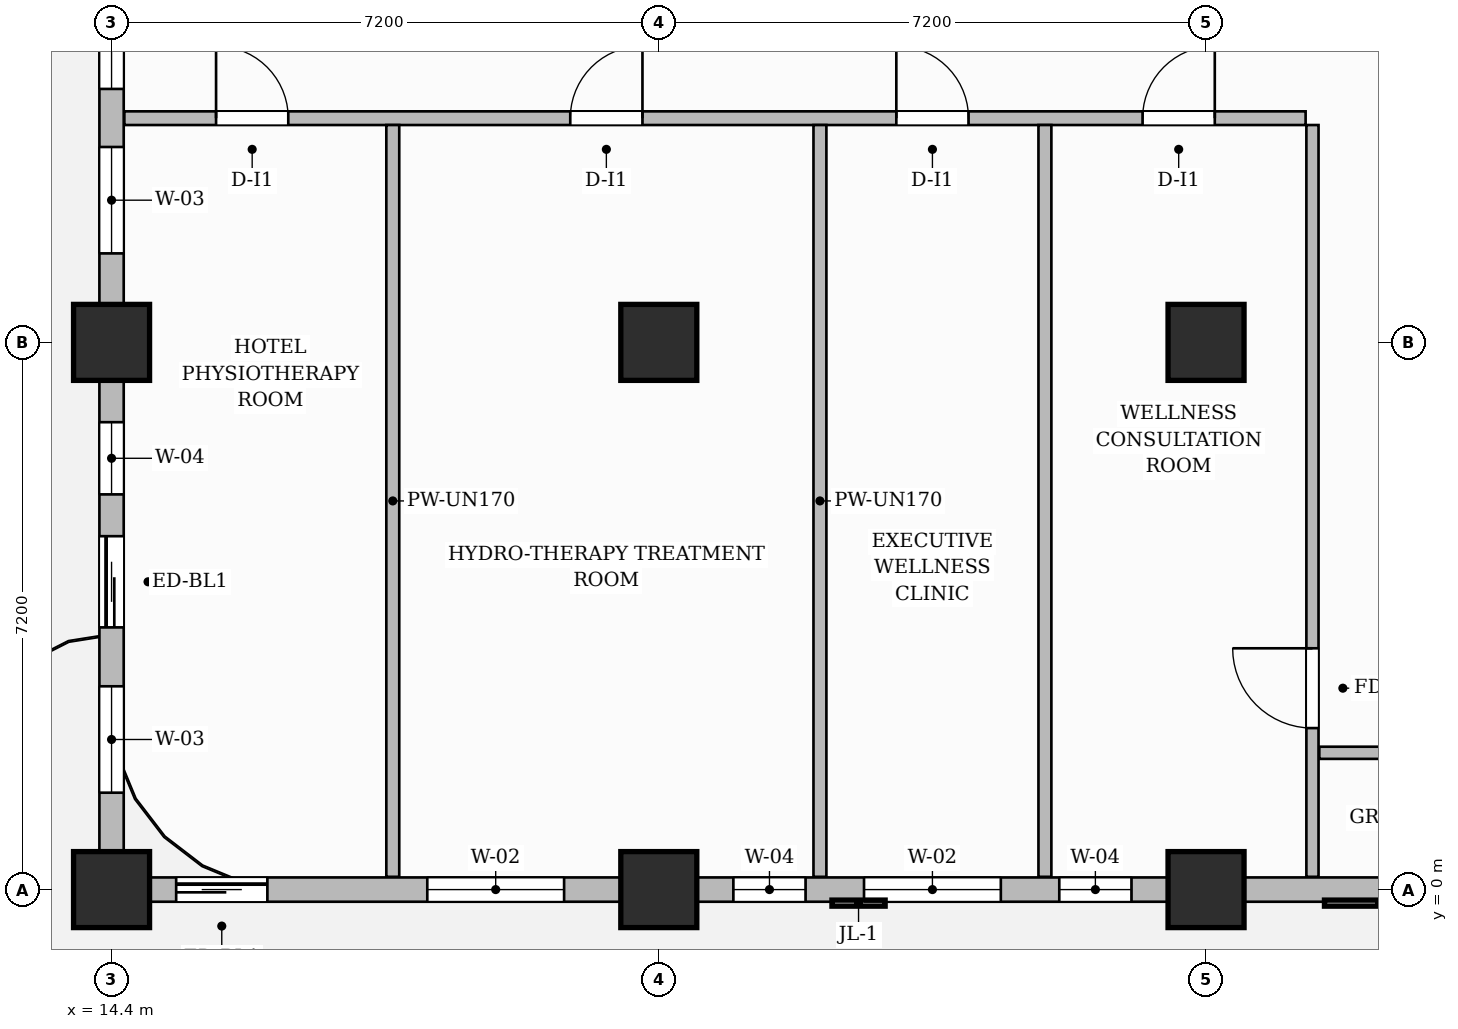
"""IFC4 building model, lengths in metres.
Left out: names, types, materials, properties, quantities, classifications, styles, units other than length and angle.
Written with IfcOpenShell. Run it as: python <this file> out.ifc"""

import sys

from ifc_helpers import new_model, si_unit, direction, frame, frame_2d, origin, origin_2d, place, context, subcontext, project, spatial, rectangle, extrude, source, transform, mapped, element, fill, save


model = new_model("IFC4")
c1 = context("Model", 3, precision=1e-05, world=origin(), true_north=direction((0.0, 1.0)))
c2 = subcontext(c1, "Body", "Model", "MODEL_VIEW")
j1 = project(units=[si_unit("LENGTHUNIT", "METRE"), si_unit("PLANEANGLEUNIT", "RADIAN")], contexts=[c1])
p1 = place(None, origin())
s1 = spatial("IfcSite", under=j1, at=p1, CompositionType="ELEMENT")
p2 = place(p1, origin())
s2 = spatial("IfcBuilding", under=s1, at=p2, CompositionType="ELEMENT")
p3 = place(p2, frame((0.0, 0.0, 137.7)))
s3 = spatial("IfcBuildingStorey", under=s2, at=p3, CompositionType="ELEMENT", Elevation=137.7)
m1 = source(origin(), c2, "Body", "SweptSolid", [
    extrude(rectangle(XDim=1.0, YDim=1.0, at=origin_2d()), origin(), (0.0, 0.0, 1.0), 3.7),
])
for number, where, z_axis, x_axis in (
    (1, (14.4, 0.0, 0.0), (0.0, 0.0, 1.0), (1.0, 0.0, 0.0)),
    (2, (14.4, 7.2, 0.0), (0.0, 0.0, 1.0), (1.0, 0.0, 0.0)),
    (3, (21.6, 0.0, 0.0), (0.0, 0.0, 1.0), (1.0, 0.0, 0.0)),
    (4, (21.6, 7.2, 0.0), (0.0, 0.0, 1.0), (1.0, 0.0, 0.0)),
    (5, (28.8, 0.0, 0.0), (0.0, 0.0, 1.0), (1.0, 0.0, 0.0)),
    (6, (28.8, 7.2, 0.0), (0.0, 0.0, 1.0), (1.0, 0.0, 0.0)),
):
    element("IfcColumn", number, at=place(p3, frame(where, z_axis=z_axis, x_axis=x_axis)), inside=s3, PredefinedType="COLUMN", context=c2, shape_type="MappedRepresentation", body=[
        mapped(m1, transform((0.0, 0.0, 0.0), scale=1.0)),
    ])
p4 = place(p3, frame((14.568, 10.15, 0.0), z_axis=(0.0, 0.0, 1.0), x_axis=(1.0, 0.0, 0.0)))
e7 = element("IfcWall", 7, at=p4, inside=s3, PredefinedType="PARTITIONING", context=c2, shape_type="SweptSolid", body=[
    extrude(rectangle(XDim=15.542, YDim=0.18, at=frame_2d((7.771, 0.0))), origin(), (0.0, 0.0, 1.0), 3.45),
])
p5 = place(p4, frame((1.207, 0.0, 0.0)))
e8 = element("IfcOpeningElement", 8, at=p5, cuts=e7, PredefinedType="OPENING", context=c2, shape_type="SweptSolid", body=[
    extrude(rectangle(XDim=0.95, YDim=2.15, at=frame_2d((0.475, 1.075))), frame((0.0, 0.1, 0.0), z_axis=(0.0, -1.0, 0.0), x_axis=(1.0, 0.0, 0.0)), (0.0, 0.0, 1.0), 0.2),
])
p6 = place(p4, frame((5.867, 0.0, 0.0)))
e9 = element("IfcOpeningElement", 9, at=p6, cuts=e7, PredefinedType="OPENING", context=c2, shape_type="SweptSolid", body=[
    extrude(rectangle(XDim=0.95, YDim=2.15, at=frame_2d((0.475, 1.075))), frame((0.0, 0.1, 0.0), z_axis=(0.0, -1.0, 0.0), x_axis=(1.0, 0.0, 0.0)), (0.0, 0.0, 1.0), 0.2),
])
p7 = place(p4, frame((10.157, 0.0, 0.0)))
e10 = element("IfcOpeningElement", 10, at=p7, cuts=e7, PredefinedType="OPENING", context=c2, shape_type="SweptSolid", body=[
    extrude(rectangle(XDim=0.95, YDim=2.15, at=frame_2d((0.475, 1.075))), frame((0.0, 0.1, 0.0), z_axis=(0.0, -1.0, 0.0), x_axis=(1.0, 0.0, 0.0)), (0.0, 0.0, 1.0), 0.2),
])
p8 = place(p4, frame((13.397, 0.0, 0.0)))
e11 = element("IfcOpeningElement", 11, at=p8, cuts=e7, PredefinedType="OPENING", context=c2, shape_type="SweptSolid", body=[
    extrude(rectangle(XDim=0.95, YDim=2.15, at=frame_2d((0.475, 1.075))), frame((0.0, 0.1, 0.0), z_axis=(0.0, -1.0, 0.0), x_axis=(1.0, 0.0, 0.0)), (0.0, 0.0, 1.0), 0.2),
])
p9 = place(p3, frame((30.2, 0.168, 0.0), z_axis=(0.0, 0.0, 1.0), x_axis=(0.0, 1.0, 0.0)))
e12 = element("IfcWall", 12, at=p9, inside=s3, PredefinedType="PARTITIONING", context=c2, shape_type="SweptSolid", body=[
    extrude(rectangle(XDim=9.892, YDim=0.16, at=frame_2d((4.946, 0.0))), origin(), (0.0, 0.0, 1.0), 3.45),
])
p10 = place(p9, frame((1.957, 0.0, 0.0)))
e13 = element("IfcOpeningElement", 13, at=p10, cuts=e12, PredefinedType="OPENING", context=c2, shape_type="SweptSolid", body=[
    extrude(rectangle(XDim=1.05, YDim=2.15, at=frame_2d((0.525, 1.075))), frame((0.0, 0.09, 0.0), z_axis=(0.0, -1.0, 0.0), x_axis=(1.0, 0.0, 0.0)), (0.0, 0.0, 1.0), 0.18),
])
p11 = place(p3, frame((30.29, 1.8, 0.0), z_axis=(0.0, 0.0, 1.0), x_axis=(1.0, 0.0, 0.0)))
e14 = element("IfcWall", 14, at=p11, inside=s3, PredefinedType="PARTITIONING", context=c2, shape_type="SweptSolid", body=[
    extrude(rectangle(XDim=19.37, YDim=0.16, at=frame_2d((9.685, 0.0))), origin(), (0.0, 0.0, 1.0), 3.45),
])
p12 = place(p11, frame((2.916, 0.0, 0.0)))
e15 = element("IfcOpeningElement", 15, at=p12, cuts=e14, PredefinedType="OPENING", context=c2, shape_type="SweptSolid", body=[
    extrude(rectangle(XDim=0.9, YDim=2.15, at=frame_2d((0.45, 1.075))), frame((0.0, 0.09, 0.0), z_axis=(0.0, -1.0, 0.0), x_axis=(1.0, 0.0, 0.0)), (0.0, 0.0, 1.0), 0.18),
])
p13 = place(p11, frame((9.66, 0.0, 0.0)))
e16 = element("IfcOpeningElement", 16, at=p13, cuts=e14, PredefinedType="OPENING", context=c2, shape_type="SweptSolid", body=[
    extrude(rectangle(XDim=0.9, YDim=2.15, at=frame_2d((0.45, 1.075))), frame((0.0, 0.09, 0.0), z_axis=(0.0, -1.0, 0.0), x_axis=(1.0, 0.0, 0.0)), (0.0, 0.0, 1.0), 0.18),
])
p14 = place(p11, frame((15.86, 0.0, 0.0)))
e17 = element("IfcOpeningElement", 17, at=p14, cuts=e14, PredefinedType="OPENING", context=c2, shape_type="SweptSolid", body=[
    extrude(rectangle(XDim=0.9, YDim=2.15, at=frame_2d((0.45, 1.075))), frame((0.0, 0.09, 0.0), z_axis=(0.0, -1.0, 0.0), x_axis=(1.0, 0.0, 0.0)), (0.0, 0.0, 1.0), 0.18),
])
p15 = place(p3, frame((18.1, 0.168, 0.0), z_axis=(0.0, 0.0, 1.0), x_axis=(0.0, 1.0, 0.0)))
e18 = element("IfcWall", 18, at=p15, inside=s3, PredefinedType="PARTITIONING", context=c2, shape_type="SweptSolid", body=[
    extrude(rectangle(XDim=9.892, YDim=0.17, at=frame_2d((4.946, 0.0))), origin(), (0.0, 0.0, 1.0), 3.105),
])
for number, where, z_axis, x_axis in (
    (19, (23.72, 0.168, 0.0), (0.0, 0.0, 1.0), (0.0, 1.0, 0.0)),
    (20, (26.68, 0.168, 0.0), (0.0, 0.0, 1.0), (0.0, 1.0, 0.0)),
):
    element("IfcWall", number, at=place(p3, frame(where, z_axis=z_axis, x_axis=x_axis)), inside=s3, PredefinedType="PARTITIONING", context=c2, shape_type="SweptSolid", body=[
        extrude(rectangle(XDim=9.892, YDim=0.17, at=frame_2d((4.946, 0.0))), origin(), (0.0, 0.0, 1.0), 3.45),
    ])
p16 = place(p3, frame((14.4, 0.0, 0.0), z_axis=(0.0, 0.0, 1.0), x_axis=(1.0, 0.0, 0.0)))
e21 = element("IfcWall", 21, at=p16, inside=s3, PredefinedType="SOLIDWALL", context=c2, shape_type="SweptSolid", body=[
    extrude(rectangle(XDim=35.4, YDim=0.32, at=frame_2d((17.7, 0.0))), origin(), (0.0, 0.0, 1.0), 2.935),
])
p17 = place(p16, frame((0.85, 0.0, 0.0)))
e22 = element("IfcOpeningElement", 22, at=p17, cuts=e21, PredefinedType="OPENING", context=c2, shape_type="SweptSolid", body=[
    extrude(rectangle(XDim=1.2, YDim=2.2, at=frame_2d((0.6, 1.1))), frame((0.0, 0.17, 0.0), z_axis=(0.0, -1.0, 0.0), x_axis=(1.0, 0.0, 0.0)), (0.0, 0.0, 1.0), 0.34),
])
p18 = place(p16, frame((4.154, 0.0, 0.8)))
e23 = element("IfcOpeningElement", 23, at=p18, cuts=e21, PredefinedType="OPENING", context=c2, shape_type="SweptSolid", body=[
    extrude(rectangle(XDim=1.8, YDim=1.85, at=frame_2d((0.9, 0.925))), frame((0.0, 0.17, 0.0), z_axis=(0.0, -1.0, 0.0), x_axis=(1.0, 0.0, 0.0)), (0.0, 0.0, 1.0), 0.34),
])
p19 = place(p16, frame((8.181, 0.0, 0.8)))
e24 = element("IfcOpeningElement", 24, at=p19, cuts=e21, PredefinedType="OPENING", context=c2, shape_type="SweptSolid", body=[
    extrude(rectangle(XDim=0.95, YDim=1.75, at=frame_2d((0.475, 0.875))), frame((0.0, 0.17, 0.0), z_axis=(0.0, -1.0, 0.0), x_axis=(1.0, 0.0, 0.0)), (0.0, 0.0, 1.0), 0.34),
])
p20 = place(p16, frame((9.9, 0.0, 0.8)))
e25 = element("IfcOpeningElement", 25, at=p20, cuts=e21, PredefinedType="OPENING", context=c2, shape_type="SweptSolid", body=[
    extrude(rectangle(XDim=1.8, YDim=1.85, at=frame_2d((0.9, 0.925))), frame((0.0, 0.17, 0.0), z_axis=(0.0, -1.0, 0.0), x_axis=(1.0, 0.0, 0.0)), (0.0, 0.0, 1.0), 0.34),
])
p21 = place(p16, frame((12.469, 0.0, 0.8)))
e26 = element("IfcOpeningElement", 26, at=p21, cuts=e21, PredefinedType="OPENING", context=c2, shape_type="SweptSolid", body=[
    extrude(rectangle(XDim=0.95, YDim=1.75, at=frame_2d((0.475, 0.875))), frame((0.0, 0.17, 0.0), z_axis=(0.0, -1.0, 0.0), x_axis=(1.0, 0.0, 0.0)), (0.0, 0.0, 1.0), 0.34),
])
p22 = place(p16, frame((16.804, 0.0, 0.8)))
e27 = element("IfcOpeningElement", 27, at=p22, cuts=e21, PredefinedType="OPENING", context=c2, shape_type="SweptSolid", body=[
    extrude(rectangle(XDim=1.8, YDim=1.85, at=frame_2d((0.9, 0.925))), frame((0.0, 0.17, 0.0), z_axis=(0.0, -1.0, 0.0), x_axis=(1.0, 0.0, 0.0)), (0.0, 0.0, 1.0), 0.34),
])
p23 = place(p16, frame((21.521, 0.0, 0.8)))
e28 = element("IfcOpeningElement", 28, at=p23, cuts=e21, PredefinedType="OPENING", context=c2, shape_type="SweptSolid", body=[
    extrude(rectangle(XDim=0.95, YDim=1.75, at=frame_2d((0.475, 0.875))), frame((0.0, 0.17, 0.0), z_axis=(0.0, -1.0, 0.0), x_axis=(1.0, 0.0, 0.0)), (0.0, 0.0, 1.0), 0.34),
])
p24 = place(p16, frame((23.904, 0.0, 0.8)))
e29 = element("IfcOpeningElement", 29, at=p24, cuts=e21, PredefinedType="OPENING", context=c2, shape_type="SweptSolid", body=[
    extrude(rectangle(XDim=1.8, YDim=1.85, at=frame_2d((0.9, 0.925))), frame((0.0, 0.17, 0.0), z_axis=(0.0, -1.0, 0.0), x_axis=(1.0, 0.0, 0.0)), (0.0, 0.0, 1.0), 0.34),
])
p25 = place(p16, frame((29.681, 0.0, 0.8)))
e30 = element("IfcOpeningElement", 30, at=p25, cuts=e21, PredefinedType="OPENING", context=c2, shape_type="SweptSolid", body=[
    extrude(rectangle(XDim=1.8, YDim=1.85, at=frame_2d((0.9, 0.925))), frame((0.0, 0.17, 0.0), z_axis=(0.0, -1.0, 0.0), x_axis=(1.0, 0.0, 0.0)), (0.0, 0.0, 1.0), 0.34),
])
p26 = place(p16, frame((32.327, 0.0, 0.8)))
e31 = element("IfcOpeningElement", 31, at=p26, cuts=e21, PredefinedType="OPENING", context=c2, shape_type="SweptSolid", body=[
    extrude(rectangle(XDim=1.8, YDim=1.85, at=frame_2d((0.9, 0.925))), frame((0.0, 0.17, 0.0), z_axis=(0.0, -1.0, 0.0), x_axis=(1.0, 0.0, 0.0)), (0.0, 0.0, 1.0), 0.34),
])
p27 = place(p3, frame((14.4, 0.05, 0.0), z_axis=(0.0, 0.0, 1.0), x_axis=(0.0, 1.0, 0.0)))
e32 = element("IfcWall", 32, at=p27, inside=s3, PredefinedType="SOLIDWALL", context=c2, shape_type="SweptSolid", body=[
    extrude(rectangle(XDim=20.6, YDim=0.32, at=frame_2d((10.3, 0.0))), origin(), (0.0, 0.0, 1.0), 2.935),
])
p28 = place(p27, frame((3.4, 0.0, 0.0)))
e33 = element("IfcOpeningElement", 33, at=p28, cuts=e32, PredefinedType="OPENING", context=c2, shape_type="SweptSolid", body=[
    extrude(rectangle(XDim=1.2, YDim=2.2, at=frame_2d((0.6, 1.1))), frame((0.0, 0.17, 0.0), z_axis=(0.0, -1.0, 0.0), x_axis=(1.0, 0.0, 0.0)), (0.0, 0.0, 1.0), 0.34),
])
p29 = place(p27, frame((1.225, 0.0, 0.8)))
e34 = element("IfcOpeningElement", 34, at=p29, cuts=e32, PredefinedType="OPENING", context=c2, shape_type="SweptSolid", body=[
    extrude(rectangle(XDim=1.4, YDim=1.85, at=frame_2d((0.7, 0.925))), frame((0.0, 0.17, 0.0), z_axis=(0.0, -1.0, 0.0), x_axis=(1.0, 0.0, 0.0)), (0.0, 0.0, 1.0), 0.34),
])
p30 = place(p27, frame((5.15, 0.0, 0.8)))
e35 = element("IfcOpeningElement", 35, at=p30, cuts=e32, PredefinedType="OPENING", context=c2, shape_type="SweptSolid", body=[
    extrude(rectangle(XDim=0.95, YDim=1.75, at=frame_2d((0.475, 0.875))), frame((0.0, 0.17, 0.0), z_axis=(0.0, -1.0, 0.0), x_axis=(1.0, 0.0, 0.0)), (0.0, 0.0, 1.0), 0.34),
])
p31 = place(p27, frame((8.321, 0.0, 0.8)))
e36 = element("IfcOpeningElement", 36, at=p31, cuts=e32, PredefinedType="OPENING", context=c2, shape_type="SweptSolid", body=[
    extrude(rectangle(XDim=1.4, YDim=1.85, at=frame_2d((0.7, 0.925))), frame((0.0, 0.17, 0.0), z_axis=(0.0, -1.0, 0.0), x_axis=(1.0, 0.0, 0.0)), (0.0, 0.0, 1.0), 0.34),
])
p32 = place(p27, frame((10.485, 0.0, 0.8)))
e37 = element("IfcOpeningElement", 37, at=p32, cuts=e32, PredefinedType="OPENING", context=c2, shape_type="SweptSolid", body=[
    extrude(rectangle(XDim=1.15, YDim=1.8, at=frame_2d((0.575, 0.9))), frame((0.0, 0.17, 0.0), z_axis=(0.0, -1.0, 0.0), x_axis=(1.0, 0.0, 0.0)), (0.0, 0.0, 1.0), 0.34),
])
p33 = place(p27, frame((12.314, 0.0, 0.8)))
e38 = element("IfcOpeningElement", 38, at=p33, cuts=e32, PredefinedType="OPENING", context=c2, shape_type="SweptSolid", body=[
    extrude(rectangle(XDim=0.95, YDim=1.75, at=frame_2d((0.475, 0.875))), frame((0.0, 0.17, 0.0), z_axis=(0.0, -1.0, 0.0), x_axis=(1.0, 0.0, 0.0)), (0.0, 0.0, 1.0), 0.34),
])
p34 = place(p27, frame((16.79, 0.0, 0.8)))
e39 = element("IfcOpeningElement", 39, at=p34, cuts=e32, PredefinedType="OPENING", context=c2, shape_type="SweptSolid", body=[
    extrude(rectangle(XDim=1.8, YDim=1.85, at=frame_2d((0.9, 0.925))), frame((0.0, 0.17, 0.0), z_axis=(0.0, -1.0, 0.0), x_axis=(1.0, 0.0, 0.0)), (0.0, 0.0, 1.0), 0.34),
])
m2 = source(origin(), c2, "Body", "SweptSolid", [
    extrude(rectangle(XDim=1.05, YDim=2.15, at=frame_2d((0.525, 1.075))), frame((0.0, 0.025, 0.0), z_axis=(0.0, -1.0, 0.0), x_axis=(1.0, 0.0, 0.0)), (0.0, 0.0, 1.0), 0.05),
])
p35 = place(p10, origin())
e40 = element("IfcDoor", 40, at=p35, inside=s3, OperationType="SINGLE_SWING_RIGHT", PredefinedType="DOOR", context=c2, shape_type="MappedRepresentation", body=[
    mapped(m2, transform((0.0, 0.0, 0.0), scale=1.0)),
])
fill(e13, e40)
m3 = source(origin(), c2, "Body", "SweptSolid", [
    extrude(rectangle(XDim=0.95, YDim=2.15, at=frame_2d((0.475, 1.075))), frame((0.0, 0.025, 0.0), z_axis=(0.0, -1.0, 0.0), x_axis=(1.0, 0.0, 0.0)), (0.0, 0.0, 1.0), 0.05),
])
p36 = place(p5, origin())
e41 = element("IfcDoor", 41, at=p36, inside=s3, OperationType="SINGLE_SWING_LEFT", PredefinedType="DOOR", context=c2, shape_type="MappedRepresentation", body=[
    mapped(m3, transform((0.0, 0.0, 0.0), scale=1.0)),
])
fill(e8, e41)
p37 = place(p6, origin())
e42 = element("IfcDoor", 42, at=p37, inside=s3, OperationType="SINGLE_SWING_RIGHT", PredefinedType="DOOR", context=c2, shape_type="MappedRepresentation", body=[
    mapped(m3, transform((0.0, 0.0, 0.0), scale=1.0)),
])
fill(e9, e42)
p38 = place(p7, origin())
e43 = element("IfcDoor", 43, at=p38, inside=s3, OperationType="SINGLE_SWING_LEFT", PredefinedType="DOOR", context=c2, shape_type="MappedRepresentation", body=[
    mapped(m3, transform((0.0, 0.0, 0.0), scale=1.0)),
])
fill(e10, e43)
p39 = place(p8, origin())
e44 = element("IfcDoor", 44, at=p39, inside=s3, OperationType="SINGLE_SWING_RIGHT", PredefinedType="DOOR", context=c2, shape_type="MappedRepresentation", body=[
    mapped(m3, transform((0.0, 0.0, 0.0), scale=1.0)),
])
fill(e11, e44)
m4 = source(origin(), c2, "Body", "SweptSolid", [
    extrude(rectangle(XDim=1.2, YDim=2.2, at=frame_2d((0.6, 1.1))), frame((0.0, 0.025, 0.0), z_axis=(0.0, -1.0, 0.0), x_axis=(1.0, 0.0, 0.0)), (0.0, 0.0, 1.0), 0.05),
])
p40 = place(p17, origin())
e45 = element("IfcDoor", 45, at=p40, inside=s3, OperationType="SLIDING_TO_LEFT", PredefinedType="DOOR", context=c2, shape_type="MappedRepresentation", body=[
    mapped(m4, transform((0.0, 0.0, 0.0), scale=1.0)),
])
fill(e22, e45)
p41 = place(p28, origin())
e46 = element("IfcDoor", 46, at=p41, inside=s3, OperationType="SLIDING_TO_LEFT", PredefinedType="DOOR", context=c2, shape_type="MappedRepresentation", body=[
    mapped(m4, transform((0.0, 0.0, 0.0), scale=1.0)),
])
fill(e33, e46)
m5 = source(origin(), c2, "Body", "SweptSolid", [
    extrude(rectangle(XDim=1.8, YDim=1.85, at=frame_2d((0.9, 0.925))), frame((0.0, 0.03, 0.0), z_axis=(0.0, -1.0, 0.0), x_axis=(1.0, 0.0, 0.0)), (0.0, 0.0, 1.0), 0.06),
])
p42 = place(p18, origin())
e47 = element("IfcWindow", 47, at=p42, inside=s3, PartitioningType="DOUBLE_PANEL_VERTICAL", PredefinedType="WINDOW", context=c2, shape_type="MappedRepresentation", body=[
    mapped(m5, transform((0.0, 0.0, 0.0), scale=1.0)),
])
fill(e23, e47)
m6 = source(origin(), c2, "Body", "SweptSolid", [
    extrude(rectangle(XDim=0.95, YDim=1.75, at=frame_2d((0.475, 0.875))), frame((0.0, 0.03, 0.0), z_axis=(0.0, -1.0, 0.0), x_axis=(1.0, 0.0, 0.0)), (0.0, 0.0, 1.0), 0.06),
])
p43 = place(p19, origin())
e48 = element("IfcWindow", 48, at=p43, inside=s3, PartitioningType="SINGLE_PANEL", PredefinedType="WINDOW", context=c2, shape_type="MappedRepresentation", body=[
    mapped(m6, transform((0.0, 0.0, 0.0), scale=1.0)),
])
fill(e24, e48)
p44 = place(p20, origin())
e49 = element("IfcWindow", 49, at=p44, inside=s3, PartitioningType="DOUBLE_PANEL_VERTICAL", PredefinedType="WINDOW", context=c2, shape_type="MappedRepresentation", body=[
    mapped(m5, transform((0.0, 0.0, 0.0), scale=1.0)),
])
fill(e25, e49)
p45 = place(p21, origin())
e50 = element("IfcWindow", 50, at=p45, inside=s3, PartitioningType="SINGLE_PANEL", PredefinedType="WINDOW", context=c2, shape_type="MappedRepresentation", body=[
    mapped(m6, transform((0.0, 0.0, 0.0), scale=1.0)),
])
fill(e26, e50)
m7 = source(origin(), c2, "Body", "SweptSolid", [
    extrude(rectangle(XDim=1.4, YDim=1.85, at=frame_2d((0.7, 0.925))), frame((0.0, 0.03, 0.0), z_axis=(0.0, -1.0, 0.0), x_axis=(1.0, 0.0, 0.0)), (0.0, 0.0, 1.0), 0.06),
])
p46 = place(p29, origin())
e51 = element("IfcWindow", 51, at=p46, inside=s3, PartitioningType="SINGLE_PANEL", PredefinedType="WINDOW", context=c2, shape_type="MappedRepresentation", body=[
    mapped(m7, transform((0.0, 0.0, 0.0), scale=1.0)),
])
fill(e34, e51)
p47 = place(p30, origin())
e52 = element("IfcWindow", 52, at=p47, inside=s3, PartitioningType="SINGLE_PANEL", PredefinedType="WINDOW", context=c2, shape_type="MappedRepresentation", body=[
    mapped(m6, transform((0.0, 0.0, 0.0), scale=1.0)),
])
fill(e35, e52)
p48 = place(p31, origin())
e53 = element("IfcWindow", 53, at=p48, inside=s3, PartitioningType="SINGLE_PANEL", PredefinedType="WINDOW", context=c2, shape_type="MappedRepresentation", body=[
    mapped(m7, transform((0.0, 0.0, 0.0), scale=1.0)),
])
fill(e36, e53)
m8 = source(origin(), c2, "Body", "SweptSolid", [
    extrude(rectangle(XDim=1.15, YDim=1.8, at=frame_2d((0.575, 0.9))), frame((0.0, 0.03, 0.0), z_axis=(0.0, -1.0, 0.0), x_axis=(1.0, 0.0, 0.0)), (0.0, 0.0, 1.0), 0.06),
])
p49 = place(p32, origin())
e54 = element("IfcWindow", 54, at=p49, inside=s3, PartitioningType="SINGLE_PANEL", PredefinedType="WINDOW", context=c2, shape_type="MappedRepresentation", body=[
    mapped(m8, transform((0.0, 0.0, 0.0), scale=1.0)),
])
fill(e37, e54)
save(model, sys.argv[1])
